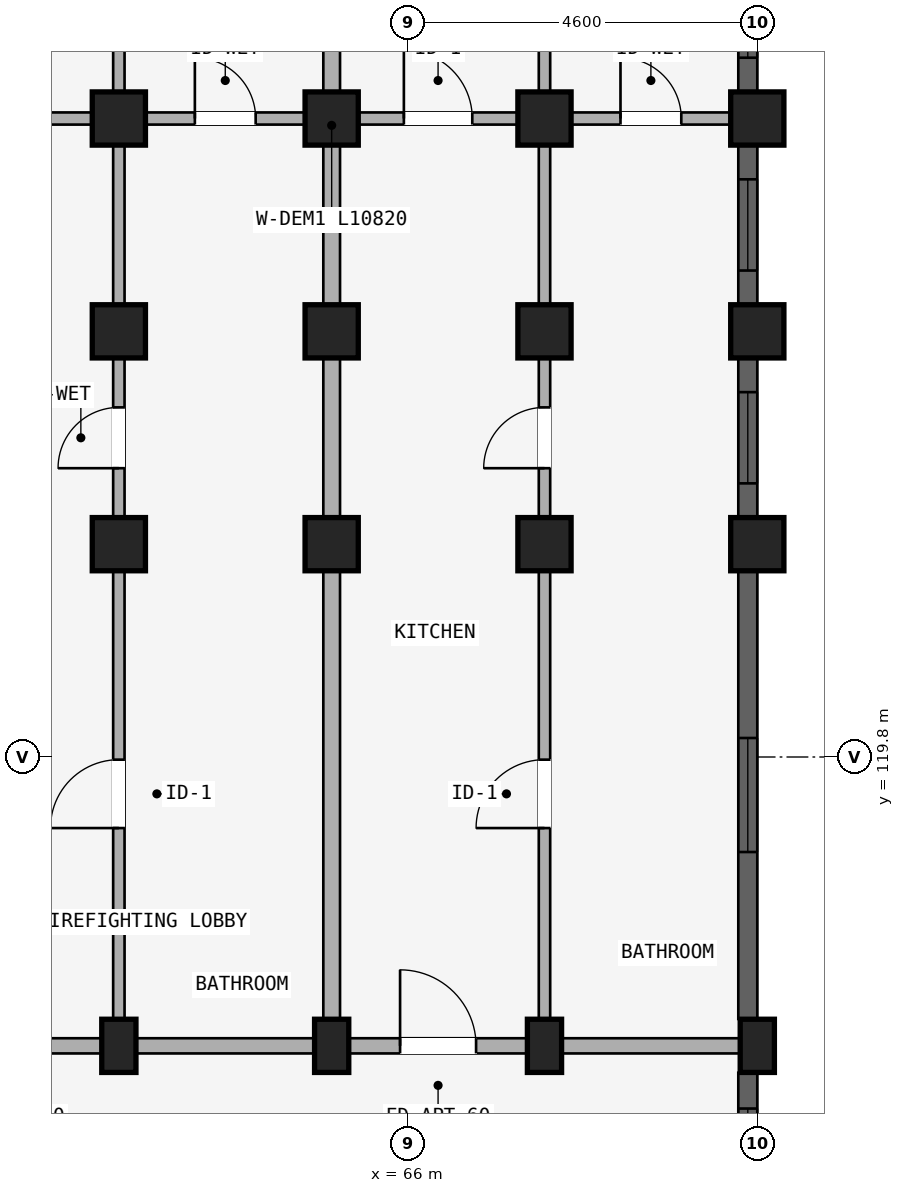
"""IFC4 building model, lengths in metres.
Left out: names, types, materials, properties, quantities, classifications, styles, units other than length and angle.
Written with IfcOpenShell. Run it as: python <this file> out.ifc"""

import sys

from ifc_helpers import new_model, si_unit, direction, frame, frame_2d, origin, origin_2d, place, context, subcontext, project, spatial, rectangle, extrude, element, fill, save


model = new_model("IFC4")
c1 = context("Model", 3, precision=1e-05, world=origin(), true_north=direction((0.0, 1.0)))
c2 = subcontext(c1, "Body", "Model", "MODEL_VIEW")
j1 = project(units=[si_unit("LENGTHUNIT", "METRE"), si_unit("PLANEANGLEUNIT", "RADIAN")], contexts=[c1])
p1 = place(None, origin())
s1 = spatial("IfcSite", under=j1, at=p1, CompositionType="ELEMENT")
p2 = place(p1, origin())
s2 = spatial("IfcBuilding", under=s1, at=p2, CompositionType="ELEMENT")
p3 = place(p2, frame((0.0, 0.0, 21.3)))
s3 = spatial("IfcBuildingStorey", under=s2, at=p3, CompositionType="ELEMENT", Elevation=21.3)
p4 = place(p3, frame((62.2, 116.0, 0.0), z_axis=(0.0, 0.0, 1.0), x_axis=(1.0, 0.0, 0.0)))
e1 = element("IfcColumn", 1, at=p4, inside=s3, PredefinedType="COLUMN", context=c2, shape_type="SweptSolid", body=[
    extrude(rectangle(XDim=0.45, YDim=0.7, at=origin_2d()), origin(), (0.0, 0.0, 1.0), 2.93),
])
for number, where, z_axis, x_axis in (
    (2, (62.2, 122.6, 0.0), (0.0, 0.0, 1.0), (1.0, 0.0, 0.0)),
    (3, (62.2, 125.4, 0.0), (0.0, 0.0, 1.0), (1.0, 0.0, 0.0)),
    (4, (62.2, 128.2, 0.0), (0.0, 0.0, 1.0), (1.0, 0.0, 0.0)),
):
    element("IfcColumn", number, at=place(p3, frame(where, z_axis=z_axis, x_axis=x_axis)), inside=s3, PredefinedType="COLUMN", context=c2, shape_type="SweptSolid", body=[
        extrude(rectangle(XDim=0.7, YDim=0.7, at=origin_2d()), origin(), (0.0, 0.0, 1.0), 2.93),
    ])
p5 = place(p3, frame((65.0, 116.0, 0.0), z_axis=(0.0, 0.0, 1.0), x_axis=(1.0, 0.0, 0.0)))
e5 = element("IfcColumn", 5, at=p5, inside=s3, PredefinedType="COLUMN", context=c2, shape_type="SweptSolid", body=[
    extrude(rectangle(XDim=0.45, YDim=0.7, at=origin_2d()), origin(), (0.0, 0.0, 1.0), 2.93),
])
for number, where, z_axis, x_axis in (
    (6, (65.0, 122.6, 0.0), (0.0, 0.0, 1.0), (1.0, 0.0, 0.0)),
    (7, (65.0, 125.4, 0.0), (0.0, 0.0, 1.0), (1.0, 0.0, 0.0)),
    (8, (65.0, 128.2, 0.0), (0.0, 0.0, 1.0), (1.0, 0.0, 0.0)),
):
    element("IfcColumn", number, at=place(p3, frame(where, z_axis=z_axis, x_axis=x_axis)), inside=s3, PredefinedType="COLUMN", context=c2, shape_type="SweptSolid", body=[
        extrude(rectangle(XDim=0.7, YDim=0.7, at=origin_2d()), origin(), (0.0, 0.0, 1.0), 2.93),
    ])
p6 = place(p3, frame((67.8, 116.0, 0.0), z_axis=(0.0, 0.0, 1.0), x_axis=(1.0, 0.0, 0.0)))
e9 = element("IfcColumn", 9, at=p6, inside=s3, PredefinedType="COLUMN", context=c2, shape_type="SweptSolid", body=[
    extrude(rectangle(XDim=0.45, YDim=0.7, at=origin_2d()), origin(), (0.0, 0.0, 1.0), 2.93),
])
for number, where, z_axis, x_axis in (
    (10, (67.8, 122.6, 0.0), (0.0, 0.0, 1.0), (1.0, 0.0, 0.0)),
    (11, (67.8, 125.4, 0.0), (0.0, 0.0, 1.0), (1.0, 0.0, 0.0)),
    (12, (67.8, 128.2, 0.0), (0.0, 0.0, 1.0), (1.0, 0.0, 0.0)),
):
    element("IfcColumn", number, at=place(p3, frame(where, z_axis=z_axis, x_axis=x_axis)), inside=s3, PredefinedType="COLUMN", context=c2, shape_type="SweptSolid", body=[
        extrude(rectangle(XDim=0.7, YDim=0.7, at=origin_2d()), origin(), (0.0, 0.0, 1.0), 2.93),
    ])
p7 = place(p3, frame((70.6, 116.0, 0.0), z_axis=(0.0, 0.0, 1.0), x_axis=(1.0, 0.0, 0.0)))
e13 = element("IfcColumn", 13, at=p7, inside=s3, PredefinedType="COLUMN", context=c2, shape_type="SweptSolid", body=[
    extrude(rectangle(XDim=0.45, YDim=0.7, at=origin_2d()), origin(), (0.0, 0.0, 1.0), 2.93),
])
for number, where, z_axis, x_axis in (
    (14, (70.6, 122.6, 0.0), (0.0, 0.0, 1.0), (1.0, 0.0, 0.0)),
    (15, (70.6, 125.4, 0.0), (0.0, 0.0, 1.0), (1.0, 0.0, 0.0)),
    (16, (70.6, 128.2, 0.0), (0.0, 0.0, 1.0), (1.0, 0.0, 0.0)),
):
    element("IfcColumn", number, at=place(p3, frame(where, z_axis=z_axis, x_axis=x_axis)), inside=s3, PredefinedType="COLUMN", context=c2, shape_type="SweptSolid", body=[
        extrude(rectangle(XDim=0.7, YDim=0.7, at=origin_2d()), origin(), (0.0, 0.0, 1.0), 2.93),
    ])
p8 = place(p3, frame((59.4, 116.0, 0.0), z_axis=(0.0, 0.0, 1.0), x_axis=(1.0, 0.0, 0.0)))
e17 = element("IfcWall", 17, at=p8, inside=s3, PredefinedType="STANDARD", context=c2, shape_type="SweptSolid", body=[
    extrude(rectangle(XDim=2.8, YDim=0.2, at=frame_2d((1.4, 0.0))), origin(), (0.0, 0.0, 1.0), 2.372),
])
p9 = place(p8, frame((0.9, 0.0, 0.0)))
e18 = element("IfcOpeningElement", 18, at=p9, cuts=e17, PredefinedType="OPENING", context=c2, shape_type="SweptSolid", body=[
    extrude(rectangle(XDim=1.0, YDim=2.15, at=frame_2d((0.5, 1.075))), frame((0.0, 0.11, 0.0), z_axis=(0.0, -1.0, 0.0), x_axis=(1.0, 0.0, 0.0)), (0.0, 0.0, 1.0), 0.22),
])
p10 = place(p3, frame((59.48, 128.2, 0.0), z_axis=(0.0, 0.0, 1.0), x_axis=(1.0, 0.0, 0.0)))
e19 = element("IfcWall", 19, at=p10, inside=s3, PredefinedType="PLUMBINGWALL", context=c2, shape_type="SweptSolid", body=[
    extrude(rectangle(XDim=2.64, YDim=0.16, at=frame_2d((1.32, 0.0))), origin(), (0.0, 0.0, 1.0), 2.372),
])
p11 = place(p10, frame((0.87, 0.0, 0.0)))
e20 = element("IfcOpeningElement", 20, at=p11, cuts=e19, PredefinedType="OPENING", context=c2, shape_type="SweptSolid", body=[
    extrude(rectangle(XDim=0.9, YDim=2.1, at=frame_2d((0.45, 1.05))), frame((0.0, 0.09, 0.0), z_axis=(0.0, -1.0, 0.0), x_axis=(1.0, 0.0, 0.0)), (0.0, 0.0, 1.0), 0.18),
])
p12 = place(p3, frame((62.2, 116.0, 0.0), z_axis=(0.0, 0.0, 1.0), x_axis=(1.0, 0.0, 0.0)))
e21 = element("IfcWall", 21, at=p12, inside=s3, PredefinedType="STANDARD", context=c2, shape_type="SweptSolid", body=[
    extrude(rectangle(XDim=2.8, YDim=0.2, at=frame_2d((1.4, 0.0))), origin(), (0.0, 0.0, 1.0), 2.372),
])
p13 = place(p3, frame((62.28, 128.2, 0.0), z_axis=(0.0, 0.0, 1.0), x_axis=(1.0, 0.0, 0.0)))
e22 = element("IfcWall", 22, at=p13, inside=s3, PredefinedType="PLUMBINGWALL", context=c2, shape_type="SweptSolid", body=[
    extrude(rectangle(XDim=2.64, YDim=0.16, at=frame_2d((1.32, 0.0))), origin(), (0.0, 0.0, 1.0), 2.372),
])
p14 = place(p13, frame((0.92, 0.0, 0.0)))
e23 = element("IfcOpeningElement", 23, at=p14, cuts=e22, PredefinedType="OPENING", context=c2, shape_type="SweptSolid", body=[
    extrude(rectangle(XDim=0.8, YDim=2.1, at=frame_2d((0.4, 1.05))), frame((0.0, 0.09, 0.0), z_axis=(0.0, -1.0, 0.0), x_axis=(1.0, 0.0, 0.0)), (0.0, 0.0, 1.0), 0.18),
])
p15 = place(p3, frame((65.0, 116.0, 0.0), z_axis=(0.0, 0.0, 1.0), x_axis=(1.0, 0.0, 0.0)))
e24 = element("IfcWall", 24, at=p15, inside=s3, PredefinedType="STANDARD", context=c2, shape_type="SweptSolid", body=[
    extrude(rectangle(XDim=2.8, YDim=0.2, at=frame_2d((1.4, 0.0))), origin(), (0.0, 0.0, 1.0), 2.372),
])
p16 = place(p15, frame((0.9, 0.0, 0.0)))
e25 = element("IfcOpeningElement", 25, at=p16, cuts=e24, PredefinedType="OPENING", context=c2, shape_type="SweptSolid", body=[
    extrude(rectangle(XDim=1.0, YDim=2.15, at=frame_2d((0.5, 1.075))), frame((0.0, 0.11, 0.0), z_axis=(0.0, -1.0, 0.0), x_axis=(1.0, 0.0, 0.0)), (0.0, 0.0, 1.0), 0.22),
])
p17 = place(p3, frame((65.08, 128.2, 0.0), z_axis=(0.0, 0.0, 1.0), x_axis=(1.0, 0.0, 0.0)))
e26 = element("IfcWall", 26, at=p17, inside=s3, PredefinedType="PLUMBINGWALL", context=c2, shape_type="SweptSolid", body=[
    extrude(rectangle(XDim=2.64, YDim=0.16, at=frame_2d((1.32, 0.0))), origin(), (0.0, 0.0, 1.0), 2.372),
])
p18 = place(p17, frame((0.87, 0.0, 0.0)))
e27 = element("IfcOpeningElement", 27, at=p18, cuts=e26, PredefinedType="OPENING", context=c2, shape_type="SweptSolid", body=[
    extrude(rectangle(XDim=0.9, YDim=2.1, at=frame_2d((0.45, 1.05))), frame((0.0, 0.09, 0.0), z_axis=(0.0, -1.0, 0.0), x_axis=(1.0, 0.0, 0.0)), (0.0, 0.0, 1.0), 0.18),
])
p19 = place(p3, frame((67.8, 116.0, 0.0), z_axis=(0.0, 0.0, 1.0), x_axis=(1.0, 0.0, 0.0)))
e28 = element("IfcWall", 28, at=p19, inside=s3, PredefinedType="STANDARD", context=c2, shape_type="SweptSolid", body=[
    extrude(rectangle(XDim=2.8, YDim=0.2, at=frame_2d((1.4, 0.0))), origin(), (0.0, 0.0, 1.0), 2.372),
])
p20 = place(p3, frame((67.88, 128.2, 0.0), z_axis=(0.0, 0.0, 1.0), x_axis=(1.0, 0.0, 0.0)))
e29 = element("IfcWall", 29, at=p20, inside=s3, PredefinedType="PLUMBINGWALL", context=c2, shape_type="SweptSolid", body=[
    extrude(rectangle(XDim=2.64, YDim=0.16, at=frame_2d((1.32, 0.0))), origin(), (0.0, 0.0, 1.0), 2.372),
])
p21 = place(p20, frame((0.92, 0.0, 0.0)))
e30 = element("IfcOpeningElement", 30, at=p21, cuts=e29, PredefinedType="OPENING", context=c2, shape_type="SweptSolid", body=[
    extrude(rectangle(XDim=0.8, YDim=2.1, at=frame_2d((0.4, 1.05))), frame((0.0, 0.09, 0.0), z_axis=(0.0, -1.0, 0.0), x_axis=(1.0, 0.0, 0.0)), (0.0, 0.0, 1.0), 0.18),
])
p22 = place(p3, frame((62.2, 116.05, 0.0), z_axis=(0.0, 0.0, 1.0), x_axis=(0.0, 1.0, 0.0)))
e31 = element("IfcWall", 31, at=p22, inside=s3, PredefinedType="PARTITIONING", context=c2, shape_type="SweptSolid", body=[
    extrude(rectangle(XDim=6.53, YDim=0.15, at=frame_2d((3.265, 0.0))), origin(), (0.0, 0.0, 1.0), 2.372),
])
p23 = place(p22, frame((2.815, 0.0, 0.0)))
e32 = element("IfcOpeningElement", 32, at=p23, cuts=e31, PredefinedType="OPENING", context=c2, shape_type="SweptSolid", body=[
    extrude(rectangle(XDim=0.9, YDim=2.1, at=frame_2d((0.45, 1.05))), frame((0.0, 0.085, 0.0), z_axis=(0.0, -1.0, 0.0), x_axis=(1.0, 0.0, 0.0)), (0.0, 0.0, 1.0), 0.17),
])
p24 = place(p3, frame((62.2, 122.7, 0.0), z_axis=(0.0, 0.0, 1.0), x_axis=(0.0, 1.0, 0.0)))
e33 = element("IfcWall", 33, at=p24, inside=s3, PredefinedType="PARTITIONING", context=c2, shape_type="SweptSolid", body=[
    extrude(rectangle(XDim=10.82, YDim=0.15, at=frame_2d((5.41, 0.0))), origin(), (0.0, 0.0, 1.0), 2.372),
])
p25 = place(p24, frame((0.899, 0.0, 0.0)))
e34 = element("IfcOpeningElement", 34, at=p25, cuts=e33, PredefinedType="OPENING", context=c2, shape_type="SweptSolid", body=[
    extrude(rectangle(XDim=0.8, YDim=2.1, at=frame_2d((0.4, 1.05))), frame((0.0, 0.085, 0.0), z_axis=(0.0, -1.0, 0.0), x_axis=(1.0, 0.0, 0.0)), (0.0, 0.0, 1.0), 0.17),
])
p26 = place(p3, frame((65.0, 116.05, 0.0), z_axis=(0.0, 0.0, 1.0), x_axis=(0.0, 1.0, 0.0)))
e35 = element("IfcWall", 35, at=p26, inside=s3, PredefinedType="STANDARD", context=c2, shape_type="SweptSolid", body=[
    extrude(rectangle(XDim=6.53, YDim=0.22, at=frame_2d((3.265, 0.0))), origin(), (0.0, 0.0, 1.0), 2.372),
])
p27 = place(p3, frame((65.0, 122.7, 0.0), z_axis=(0.0, 0.0, 1.0), x_axis=(0.0, 1.0, 0.0)))
e36 = element("IfcWall", 36, at=p27, inside=s3, PredefinedType="STANDARD", context=c2, shape_type="SweptSolid", body=[
    extrude(rectangle(XDim=10.82, YDim=0.22, at=frame_2d((5.41, 0.0))), origin(), (0.0, 0.0, 1.0), 2.372),
])
p28 = place(p3, frame((67.8, 116.05, 0.0), z_axis=(0.0, 0.0, 1.0), x_axis=(0.0, 1.0, 0.0)))
e37 = element("IfcWall", 37, at=p28, inside=s3, PredefinedType="PARTITIONING", context=c2, shape_type="SweptSolid", body=[
    extrude(rectangle(XDim=6.53, YDim=0.15, at=frame_2d((3.265, 0.0))), origin(), (0.0, 0.0, 1.0), 2.372),
])
p29 = place(p28, frame((2.815, 0.0, 0.0)))
e38 = element("IfcOpeningElement", 38, at=p29, cuts=e37, PredefinedType="OPENING", context=c2, shape_type="SweptSolid", body=[
    extrude(rectangle(XDim=0.9, YDim=2.1, at=frame_2d((0.45, 1.05))), frame((0.0, 0.085, 0.0), z_axis=(0.0, -1.0, 0.0), x_axis=(1.0, 0.0, 0.0)), (0.0, 0.0, 1.0), 0.17),
])
p30 = place(p3, frame((67.8, 122.7, 0.0), z_axis=(0.0, 0.0, 1.0), x_axis=(0.0, 1.0, 0.0)))
e39 = element("IfcWall", 39, at=p30, inside=s3, PredefinedType="PARTITIONING", context=c2, shape_type="SweptSolid", body=[
    extrude(rectangle(XDim=10.82, YDim=0.15, at=frame_2d((5.41, 0.0))), origin(), (0.0, 0.0, 1.0), 2.372),
])
p31 = place(p30, frame((0.899, 0.0, 0.0)))
e40 = element("IfcOpeningElement", 40, at=p31, cuts=e39, PredefinedType="OPENING", context=c2, shape_type="SweptSolid", body=[
    extrude(rectangle(XDim=0.8, YDim=2.1, at=frame_2d((0.4, 1.05))), frame((0.0, 0.085, 0.0), z_axis=(0.0, -1.0, 0.0), x_axis=(1.0, 0.0, 0.0)), (0.0, 0.0, 1.0), 0.17),
])
p32 = place(p3, frame((70.475, 113.954, 0.0), z_axis=(0.0, 0.0, 1.0), x_axis=(0.0, 1.0, 0.0)))
e41 = element("IfcWall", 41, at=p32, inside=s3, PredefinedType="STANDARD", context=c2, shape_type="SweptSolid", body=[
    extrude(rectangle(XDim=1.693, YDim=0.25, at=frame_2d((0.846, 0.0))), origin(), (0.0, 0.0, 1.0), 2.372),
])
p33 = place(p32, frame((0.471, 0.0, 0.88)))
e42 = element("IfcOpeningElement", 42, at=p33, cuts=e41, PredefinedType="OPENING", context=c2, shape_type="SweptSolid", body=[
    extrude(rectangle(XDim=0.75, YDim=1.05, at=frame_2d((0.375, 0.525))), frame((0.0, 0.135, 0.0), z_axis=(0.0, -1.0, 0.0), x_axis=(1.0, 0.0, 0.0)), (0.0, 0.0, 1.0), 0.27),
])
p34 = place(p3, frame((70.475, 116.354, 0.0), z_axis=(0.0, 0.0, 1.0), x_axis=(0.0, 1.0, 0.0)))
e43 = element("IfcWall", 43, at=p34, inside=s3, PredefinedType="STANDARD", context=c2, shape_type="SweptSolid", body=[
    extrude(rectangle(XDim=5.893, YDim=0.25, at=frame_2d((2.947, 0.0))), origin(), (0.0, 0.0, 1.0), 2.372),
])
p35 = place(p34, frame((2.197, 0.0, 0.522)))
e44 = element("IfcOpeningElement", 44, at=p35, cuts=e43, PredefinedType="OPENING", context=c2, shape_type="SweptSolid", body=[
    extrude(rectangle(XDim=1.5, YDim=1.65, at=frame_2d((0.75, 0.825))), frame((0.0, 0.135, 0.0), z_axis=(0.0, -1.0, 0.0), x_axis=(1.0, 0.0, 0.0)), (0.0, 0.0, 1.0), 0.27),
])
p36 = place(p3, frame((70.475, 122.954, 0.0), z_axis=(0.0, 0.0, 1.0), x_axis=(0.0, 1.0, 0.0)))
e45 = element("IfcWall", 45, at=p36, inside=s3, PredefinedType="STANDARD", context=c2, shape_type="SweptSolid", body=[
    extrude(rectangle(XDim=2.093, YDim=0.25, at=frame_2d((1.046, 0.0))), origin(), (0.0, 0.0, 1.0), 2.372),
])
p37 = place(p36, frame((0.447, 0.0, 0.672)))
e46 = element("IfcOpeningElement", 46, at=p37, cuts=e45, PredefinedType="OPENING", context=c2, shape_type="SweptSolid", body=[
    extrude(rectangle(XDim=1.2, YDim=1.5, at=frame_2d((0.6, 0.75))), frame((0.0, 0.135, 0.0), z_axis=(0.0, -1.0, 0.0), x_axis=(1.0, 0.0, 0.0)), (0.0, 0.0, 1.0), 0.27),
])
p38 = place(p3, frame((70.475, 125.753, 0.0), z_axis=(0.0, 0.0, 1.0), x_axis=(0.0, 1.0, 0.0)))
e47 = element("IfcWall", 47, at=p38, inside=s3, PredefinedType="STANDARD", context=c2, shape_type="SweptSolid", body=[
    extrude(rectangle(XDim=2.093, YDim=0.25, at=frame_2d((1.046, 0.0))), origin(), (0.0, 0.0, 1.0), 2.372),
])
p39 = place(p38, frame((0.447, 0.0, 0.672)))
e48 = element("IfcOpeningElement", 48, at=p39, cuts=e47, PredefinedType="OPENING", context=c2, shape_type="SweptSolid", body=[
    extrude(rectangle(XDim=1.2, YDim=1.5, at=frame_2d((0.6, 0.75))), frame((0.0, 0.135, 0.0), z_axis=(0.0, -1.0, 0.0), x_axis=(1.0, 0.0, 0.0)), (0.0, 0.0, 1.0), 0.27),
])
p40 = place(p3, frame((70.475, 128.553, 0.0), z_axis=(0.0, 0.0, 1.0), x_axis=(0.0, 1.0, 0.0)))
e49 = element("IfcWall", 49, at=p40, inside=s3, PredefinedType="STANDARD", context=c2, shape_type="SweptSolid", body=[
    extrude(rectangle(XDim=2.093, YDim=0.25, at=frame_2d((1.046, 0.0))), origin(), (0.0, 0.0, 1.0), 2.372),
])
p41 = place(p40, frame((0.447, 0.0, 0.672)))
e50 = element("IfcOpeningElement", 50, at=p41, cuts=e49, PredefinedType="OPENING", context=c2, shape_type="SweptSolid", body=[
    extrude(rectangle(XDim=1.2, YDim=1.5, at=frame_2d((0.6, 0.75))), frame((0.0, 0.135, 0.0), z_axis=(0.0, -1.0, 0.0), x_axis=(1.0, 0.0, 0.0)), (0.0, 0.0, 1.0), 0.27),
])
p42 = place(p33, origin())
e51 = element("IfcWindow", 51, at=p42, inside=s3, PartitioningType="SINGLE_PANEL", PredefinedType="WINDOW", context=c2, shape_type="SweptSolid", body=[
    extrude(rectangle(XDim=0.75, YDim=1.05, at=frame_2d((0.375, 0.525))), frame((0.0, 0.03, 0.0), z_axis=(0.0, -1.0, 0.0), x_axis=(1.0, 0.0, 0.0)), (0.0, 0.0, 1.0), 0.06),
])
fill(e42, e51)
p43 = place(p35, origin())
e52 = element("IfcWindow", 52, at=p43, inside=s3, PartitioningType="DOUBLE_PANEL_VERTICAL", PredefinedType="WINDOW", context=c2, shape_type="SweptSolid", body=[
    extrude(rectangle(XDim=1.5, YDim=1.65, at=frame_2d((0.75, 0.825))), frame((0.0, 0.03, 0.0), z_axis=(0.0, -1.0, 0.0), x_axis=(1.0, 0.0, 0.0)), (0.0, 0.0, 1.0), 0.06),
])
fill(e44, e52)
p44 = place(p37, origin())
e53 = element("IfcWindow", 53, at=p44, inside=s3, PartitioningType="SINGLE_PANEL", PredefinedType="WINDOW", context=c2, shape_type="SweptSolid", body=[
    extrude(rectangle(XDim=1.2, YDim=1.5, at=frame_2d((0.6, 0.75))), frame((0.0, 0.03, 0.0), z_axis=(0.0, -1.0, 0.0), x_axis=(1.0, 0.0, 0.0)), (0.0, 0.0, 1.0), 0.06),
])
fill(e46, e53)
p45 = place(p39, origin())
e54 = element("IfcWindow", 54, at=p45, inside=s3, PartitioningType="SINGLE_PANEL", PredefinedType="WINDOW", context=c2, shape_type="SweptSolid", body=[
    extrude(rectangle(XDim=1.2, YDim=1.5, at=frame_2d((0.6, 0.75))), frame((0.0, 0.03, 0.0), z_axis=(0.0, -1.0, 0.0), x_axis=(1.0, 0.0, 0.0)), (0.0, 0.0, 1.0), 0.06),
])
fill(e48, e54)
p46 = place(p41, origin())
e55 = element("IfcWindow", 55, at=p46, inside=s3, PartitioningType="SINGLE_PANEL", PredefinedType="WINDOW", context=c2, shape_type="SweptSolid", body=[
    extrude(rectangle(XDim=1.2, YDim=1.5, at=frame_2d((0.6, 0.75))), frame((0.0, 0.03, 0.0), z_axis=(0.0, -1.0, 0.0), x_axis=(1.0, 0.0, 0.0)), (0.0, 0.0, 1.0), 0.06),
])
fill(e50, e55)
p47 = place(p14, frame((0.8, 0.0, 0.0), z_axis=(0.0, 0.0, 1.0), x_axis=(-1.0, 0.0, 0.0)))
e56 = element("IfcDoor", 56, at=p47, inside=s3, OperationType="SINGLE_SWING_RIGHT", PredefinedType="DOOR", context=c2, shape_type="SweptSolid", body=[
    extrude(rectangle(XDim=0.8, YDim=2.1, at=frame_2d((0.4, 1.05))), frame((0.0, 0.025, 0.0), z_axis=(0.0, -1.0, 0.0), x_axis=(1.0, 0.0, 0.0)), (0.0, 0.0, 1.0), 0.05),
])
fill(e23, e56)
p48 = place(p18, frame((0.9, 0.0, 0.0), z_axis=(0.0, 0.0, 1.0), x_axis=(-1.0, 0.0, 0.0)))
e57 = element("IfcDoor", 57, at=p48, inside=s3, OperationType="SINGLE_SWING_RIGHT", PredefinedType="DOOR", context=c2, shape_type="SweptSolid", body=[
    extrude(rectangle(XDim=0.9, YDim=2.1, at=frame_2d((0.45, 1.05))), frame((0.0, 0.025, 0.0), z_axis=(0.0, -1.0, 0.0), x_axis=(1.0, 0.0, 0.0)), (0.0, 0.0, 1.0), 0.05),
])
fill(e27, e57)
p49 = place(p16, origin())
e58 = element("IfcDoor", 58, at=p49, inside=s3, OperationType="SINGLE_SWING_LEFT", PredefinedType="DOOR", context=c2, shape_type="SweptSolid", body=[
    extrude(rectangle(XDim=1.0, YDim=2.15, at=frame_2d((0.5, 1.075))), frame((0.0, 0.025, 0.0), z_axis=(0.0, -1.0, 0.0), x_axis=(1.0, 0.0, 0.0)), (0.0, 0.0, 1.0), 0.05),
])
fill(e25, e58)
p50 = place(p21, frame((0.8, 0.0, 0.0), z_axis=(0.0, 0.0, 1.0), x_axis=(-1.0, 0.0, 0.0)))
e59 = element("IfcDoor", 59, at=p50, inside=s3, OperationType="SINGLE_SWING_RIGHT", PredefinedType="DOOR", context=c2, shape_type="SweptSolid", body=[
    extrude(rectangle(XDim=0.8, YDim=2.1, at=frame_2d((0.4, 1.05))), frame((0.0, 0.025, 0.0), z_axis=(0.0, -1.0, 0.0), x_axis=(1.0, 0.0, 0.0)), (0.0, 0.0, 1.0), 0.05),
])
fill(e30, e59)
p51 = place(p23, origin())
e60 = element("IfcDoor", 60, at=p51, inside=s3, OperationType="SINGLE_SWING_LEFT", PredefinedType="DOOR", context=c2, shape_type="SweptSolid", body=[
    extrude(rectangle(XDim=0.9, YDim=2.1, at=frame_2d((0.45, 1.05))), frame((0.0, 0.025, 0.0), z_axis=(0.0, -1.0, 0.0), x_axis=(1.0, 0.0, 0.0)), (0.0, 0.0, 1.0), 0.05),
])
fill(e32, e60)
p52 = place(p25, frame((0.8, 0.0, 0.0), z_axis=(0.0, 0.0, 1.0), x_axis=(-1.0, 0.0, 0.0)))
e61 = element("IfcDoor", 61, at=p52, inside=s3, OperationType="SINGLE_SWING_RIGHT", PredefinedType="DOOR", context=c2, shape_type="SweptSolid", body=[
    extrude(rectangle(XDim=0.8, YDim=2.1, at=frame_2d((0.4, 1.05))), frame((0.0, 0.025, 0.0), z_axis=(0.0, -1.0, 0.0), x_axis=(1.0, 0.0, 0.0)), (0.0, 0.0, 1.0), 0.05),
])
fill(e34, e61)
p53 = place(p29, frame((0.9, 0.0, 0.0), z_axis=(0.0, 0.0, 1.0), x_axis=(-1.0, 0.0, 0.0)))
e62 = element("IfcDoor", 62, at=p53, inside=s3, OperationType="SINGLE_SWING_RIGHT", PredefinedType="DOOR", context=c2, shape_type="SweptSolid", body=[
    extrude(rectangle(XDim=0.9, YDim=2.1, at=frame_2d((0.45, 1.05))), frame((0.0, 0.025, 0.0), z_axis=(0.0, -1.0, 0.0), x_axis=(1.0, 0.0, 0.0)), (0.0, 0.0, 1.0), 0.05),
])
fill(e38, e62)
p54 = place(p31, origin())
e63 = element("IfcDoor", 63, at=p54, inside=s3, OperationType="SINGLE_SWING_LEFT", PredefinedType="DOOR", context=c2, shape_type="SweptSolid", body=[
    extrude(rectangle(XDim=0.8, YDim=2.1, at=frame_2d((0.4, 1.05))), frame((0.0, 0.025, 0.0), z_axis=(0.0, -1.0, 0.0), x_axis=(1.0, 0.0, 0.0)), (0.0, 0.0, 1.0), 0.05),
])
fill(e40, e63)
save(model, sys.argv[1])
